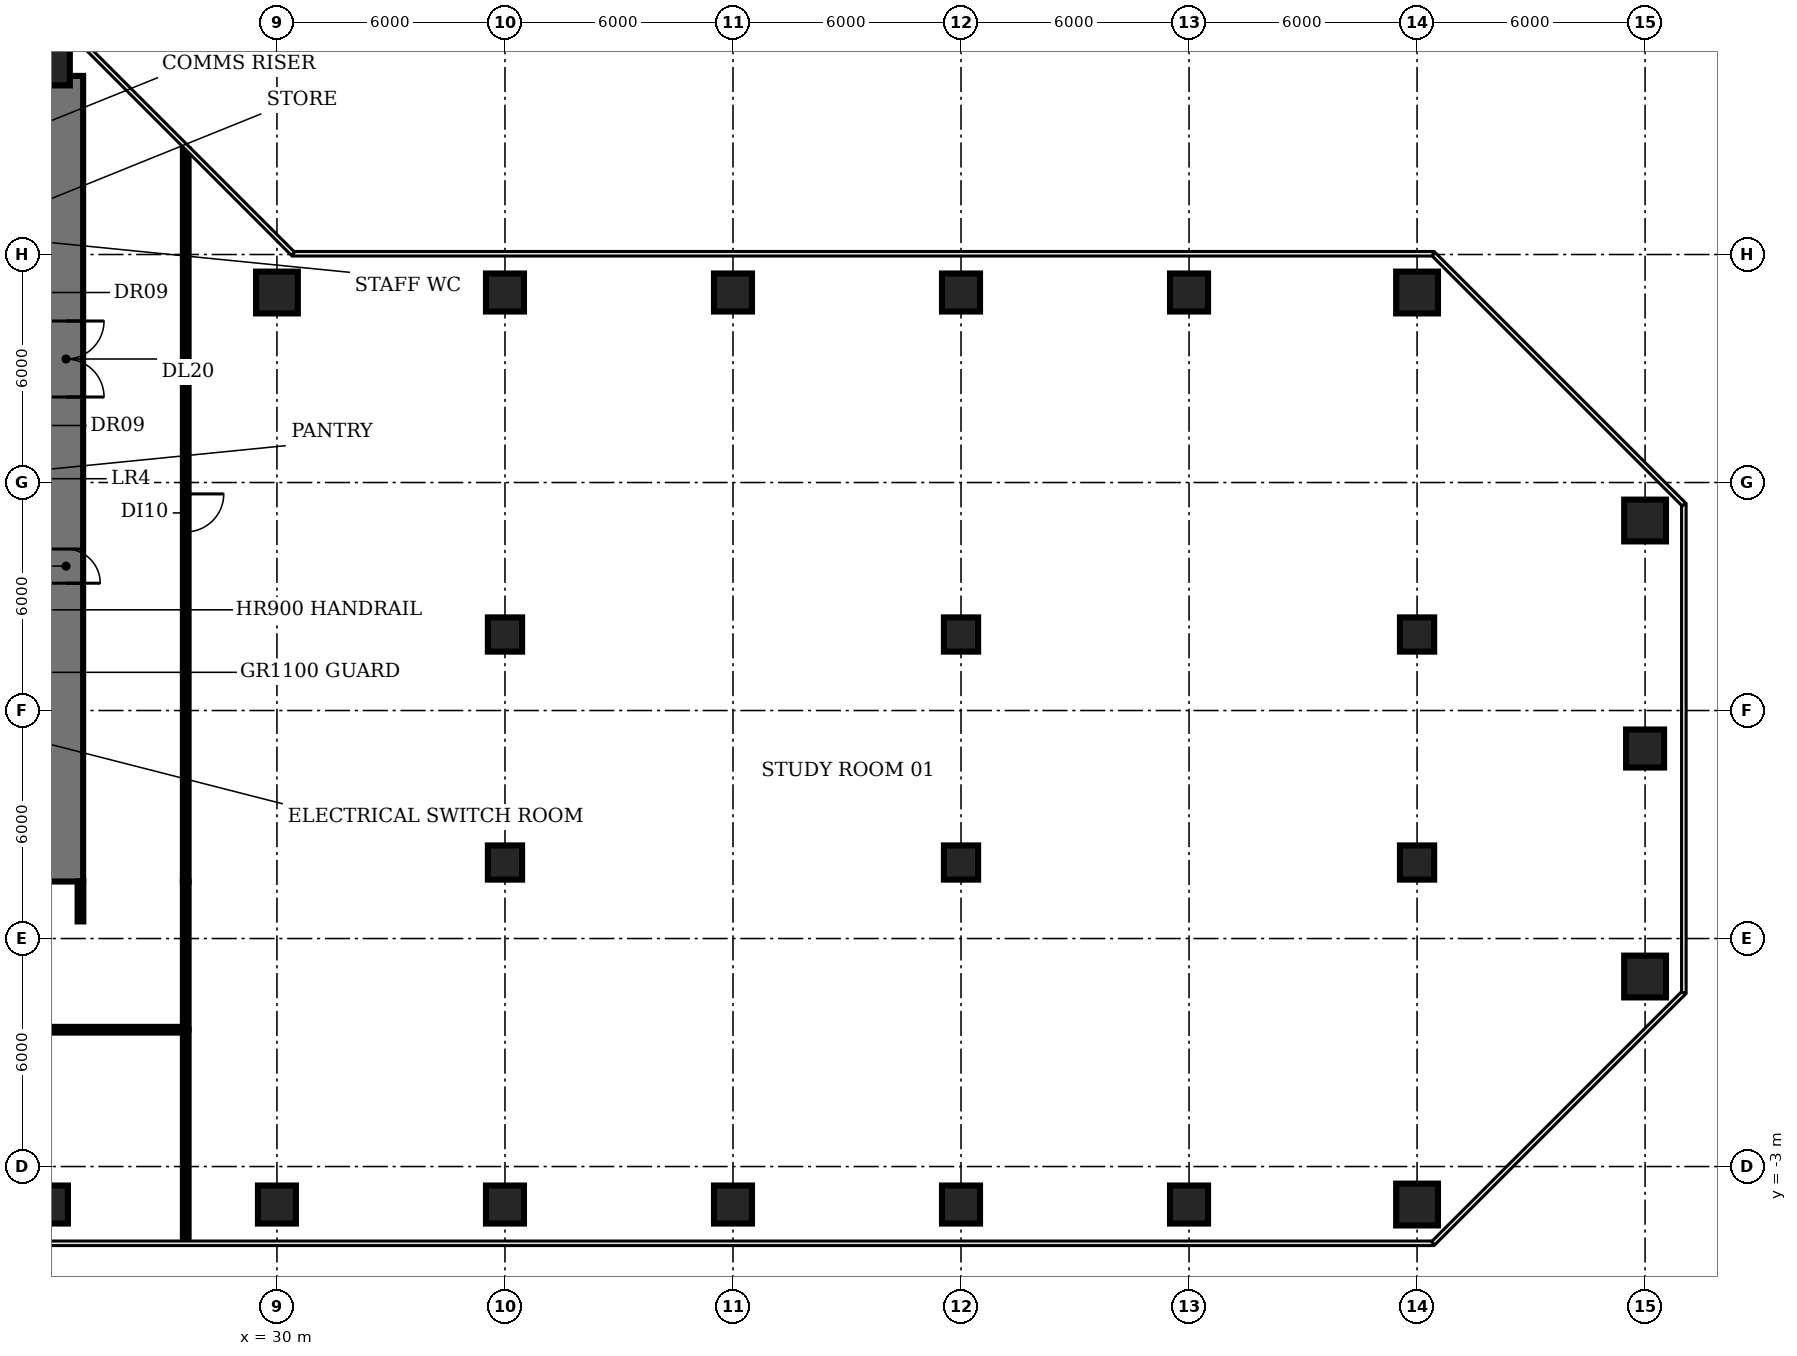
"""IFC4 building model, lengths in metres.
Left out: names, types, materials, properties, quantities, classifications, styles, units other than length and angle.
Written with IfcOpenShell. Run it as: python <this file> out.ifc"""

import sys

from ifc_helpers import new_model, si_unit, direction, frame, frame_2d, origin, origin_2d, place, context, subcontext, project, spatial, rectangle, circle, extrude, element, fill, save


model = new_model("IFC4")
c1 = context("Model", 3, precision=1e-05, world=origin(), true_north=direction((0.0, 1.0)))
c2 = subcontext(c1, "Body", "Model", "MODEL_VIEW")
j1 = project(units=[si_unit("LENGTHUNIT", "METRE"), si_unit("PLANEANGLEUNIT", "RADIAN")], contexts=[c1])
p1 = place(None, origin())
s1 = spatial("IfcSite", under=j1, at=p1, CompositionType="ELEMENT")
p2 = place(p1, origin())
s2 = spatial("IfcBuilding", under=s1, at=p2, CompositionType="ELEMENT")
p3 = place(p2, frame((0.0, 0.0, 15.5)))
s3 = spatial("IfcBuildingStorey", under=s2, at=p3, CompositionType="ELEMENT", Elevation=15.5)
p4 = place(p3, frame((24.0, -4.0, 0.0), z_axis=(0.0, 0.0, 1.0), x_axis=(1.0, 0.0, 0.0)))
e1 = element("IfcColumn", 1, at=p4, inside=s3, PredefinedType="COLUMN", context=c2, shape_type="SweptSolid", body=[
    extrude(rectangle(XDim=1.0, YDim=1.0, at=origin_2d()), origin(), (0.0, 0.0, 1.0), 4.15),
])
p5 = place(p3, frame((24.0, 26.0, 0.0), z_axis=(0.0, 0.0, 1.0), x_axis=(1.0, 0.0, 0.0)))
e2 = element("IfcColumn", 2, at=p5, inside=s3, PredefinedType="COLUMN", context=c2, shape_type="SweptSolid", body=[
    extrude(circle(Radius=0.55, at=origin_2d()), origin(), (0.0, 0.0, 1.0), 4.15),
])
p6 = place(p3, frame((30.0, -4.0, 0.0), z_axis=(0.0, 0.0, 1.0), x_axis=(1.0, 0.0, 0.0)))
e3 = element("IfcColumn", 3, at=p6, inside=s3, PredefinedType="COLUMN", context=c2, shape_type="SweptSolid", body=[
    extrude(rectangle(XDim=1.0, YDim=1.0, at=origin_2d()), origin(), (0.0, 0.0, 1.0), 4.15),
])
p7 = place(p3, frame((30.0, 20.0, 0.0), z_axis=(0.0, 0.0, 1.0), x_axis=(1.0, 0.0, 0.0)))
e4 = element("IfcColumn", 4, at=p7, inside=s3, PredefinedType="COLUMN", context=c2, shape_type="SweptSolid", body=[
    extrude(circle(Radius=0.55, at=origin_2d()), origin(), (0.0, 0.0, 1.0), 4.15),
])
p8 = place(p3, frame((36.0, -4.0, 0.0), z_axis=(0.0, 0.0, 1.0), x_axis=(1.0, 0.0, 0.0)))
e5 = element("IfcColumn", 5, at=p8, inside=s3, PredefinedType="COLUMN", context=c2, shape_type="SweptSolid", body=[
    extrude(rectangle(XDim=1.0, YDim=1.0, at=origin_2d()), origin(), (0.0, 0.0, 1.0), 4.15),
])
for number, where, z_axis, x_axis in (
    (6, (36.0, 5.0, 0.0), (0.0, 0.0, 1.0), (1.0, 0.0, 0.0)),
    (7, (36.0, 11.0, 0.0), (0.0, 0.0, 1.0), (1.0, 0.0, 0.0)),
):
    element("IfcColumn", number, at=place(p3, frame(where, z_axis=z_axis, x_axis=x_axis)), inside=s3, PredefinedType="COLUMN", context=c2, shape_type="SweptSolid", body=[
        extrude(rectangle(XDim=0.9, YDim=0.9, at=origin_2d()), origin(), (0.0, 0.0, 1.0), 4.15),
    ])
for number, where, z_axis, x_axis in (
    (8, (36.0, 20.0, 0.0), (0.0, 0.0, 1.0), (1.0, 0.0, 0.0)),
    (9, (42.0, -4.0, 0.0), (0.0, 0.0, 1.0), (1.0, 0.0, 0.0)),
    (10, (42.0, 20.0, 0.0), (0.0, 0.0, 1.0), (1.0, 0.0, 0.0)),
    (11, (48.0, -4.0, 0.0), (0.0, 0.0, 1.0), (1.0, 0.0, 0.0)),
):
    element("IfcColumn", number, at=place(p3, frame(where, z_axis=z_axis, x_axis=x_axis)), inside=s3, PredefinedType="COLUMN", context=c2, shape_type="SweptSolid", body=[
        extrude(rectangle(XDim=1.0, YDim=1.0, at=origin_2d()), origin(), (0.0, 0.0, 1.0), 4.15),
    ])
for number, where, z_axis, x_axis in (
    (12, (48.0, 5.0, 0.0), (0.0, 0.0, 1.0), (1.0, 0.0, 0.0)),
    (13, (48.0, 11.0, 0.0), (0.0, 0.0, 1.0), (1.0, 0.0, 0.0)),
):
    element("IfcColumn", number, at=place(p3, frame(where, z_axis=z_axis, x_axis=x_axis)), inside=s3, PredefinedType="COLUMN", context=c2, shape_type="SweptSolid", body=[
        extrude(rectangle(XDim=0.9, YDim=0.9, at=origin_2d()), origin(), (0.0, 0.0, 1.0), 4.15),
    ])
for number, where, z_axis, x_axis in (
    (14, (48.0, 20.0, 0.0), (0.0, 0.0, 1.0), (1.0, 0.0, 0.0)),
    (15, (54.0, -4.0, 0.0), (0.0, 0.0, 1.0), (1.0, 0.0, 0.0)),
    (16, (54.0, 20.0, 0.0), (0.0, 0.0, 1.0), (1.0, 0.0, 0.0)),
):
    element("IfcColumn", number, at=place(p3, frame(where, z_axis=z_axis, x_axis=x_axis)), inside=s3, PredefinedType="COLUMN", context=c2, shape_type="SweptSolid", body=[
        extrude(rectangle(XDim=1.0, YDim=1.0, at=origin_2d()), origin(), (0.0, 0.0, 1.0), 4.15),
    ])
p9 = place(p3, frame((60.0, -4.0, 0.0), z_axis=(0.0, 0.0, 1.0), x_axis=(1.0, 0.0, 0.0)))
e17 = element("IfcColumn", 17, at=p9, inside=s3, PredefinedType="COLUMN", context=c2, shape_type="SweptSolid", body=[
    extrude(circle(Radius=0.55, at=origin_2d()), origin(), (0.0, 0.0, 1.0), 4.15),
])
for number, where, z_axis, x_axis in (
    (18, (60.0, 5.0, 0.0), (0.0, 0.0, 1.0), (1.0, 0.0, 0.0)),
    (19, (60.0, 11.0, 0.0), (0.0, 0.0, 1.0), (1.0, 0.0, 0.0)),
):
    element("IfcColumn", number, at=place(p3, frame(where, z_axis=z_axis, x_axis=x_axis)), inside=s3, PredefinedType="COLUMN", context=c2, shape_type="SweptSolid", body=[
        extrude(rectangle(XDim=0.9, YDim=0.9, at=origin_2d()), origin(), (0.0, 0.0, 1.0), 4.15),
    ])
for number, where, z_axis, x_axis in (
    (20, (60.0, 20.0, 0.0), (0.0, 0.0, 1.0), (1.0, 0.0, 0.0)),
    (21, (66.0, 2.0, 0.0), (0.0, 0.0, 1.0), (1.0, 0.0, 0.0)),
):
    element("IfcColumn", number, at=place(p3, frame(where, z_axis=z_axis, x_axis=x_axis)), inside=s3, PredefinedType="COLUMN", context=c2, shape_type="SweptSolid", body=[
        extrude(circle(Radius=0.55, at=origin_2d()), origin(), (0.0, 0.0, 1.0), 4.15),
    ])
p10 = place(p3, frame((66.0, 8.0, 0.0), z_axis=(0.0, 0.0, 1.0), x_axis=(1.0, 0.0, 0.0)))
e22 = element("IfcColumn", 22, at=p10, inside=s3, PredefinedType="COLUMN", context=c2, shape_type="SweptSolid", body=[
    extrude(rectangle(XDim=1.0, YDim=1.0, at=origin_2d()), origin(), (0.0, 0.0, 1.0), 4.15),
])
p11 = place(p3, frame((66.0, 14.0, 0.0), z_axis=(0.0, 0.0, 1.0), x_axis=(1.0, 0.0, 0.0)))
e23 = element("IfcColumn", 23, at=p11, inside=s3, PredefinedType="COLUMN", context=c2, shape_type="SweptSolid", body=[
    extrude(circle(Radius=0.55, at=origin_2d()), origin(), (0.0, 0.0, 1.0), 4.15),
])
p12 = place(p3, frame((24.45, 25.7, 0.0), z_axis=(0.0, 0.0, 1.0), x_axis=(0.0, -1.0, 0.0)))
e24 = element("IfcWall", 24, at=p12, inside=s3, PredefinedType="SHEAR", context=c2, shape_type="SweptSolid", body=[
    extrude(rectangle(XDim=21.2, YDim=0.9, at=frame_2d((10.6, 0.0))), origin(), (0.0, 0.0, 1.0), 4.15),
])
p13 = place(p12, frame((12.45, 0.0, 0.0)))
e25 = element("IfcOpeningElement", 25, at=p13, cuts=e24, PredefinedType="OPENING", context=c2, shape_type="SweptSolid", body=[
    extrude(rectangle(XDim=0.9, YDim=2.1, at=frame_2d((0.45, 1.05))), frame((0.0, 0.46, 0.0), z_axis=(0.0, -1.0, 0.0), x_axis=(1.0, 0.0, 0.0)), (0.0, 0.0, 1.0), 0.92),
])
p14 = place(p12, frame((6.45, 0.0, 0.0)))
e26 = element("IfcOpeningElement", 26, at=p14, cuts=e24, PredefinedType="OPENING", context=c2, shape_type="SweptSolid", body=[
    extrude(rectangle(XDim=2.0, YDim=2.1, at=frame_2d((1.0, 1.05))), frame((0.0, 0.46, 0.0), z_axis=(0.0, -1.0, 0.0), x_axis=(1.0, 0.0, 0.0)), (0.0, 0.0, 1.0), 0.92),
])
p15 = place(p3, frame((24.83, 3.45, 0.0), z_axis=(0.0, 0.0, 1.0), x_axis=(0.0, 1.0, 0.0)))
e27 = element("IfcWall", 27, at=p15, inside=s3, PredefinedType="PARTITIONING", context=c2, shape_type="SweptSolid", body=[
    extrude(rectangle(XDim=1.05, YDim=0.15, at=frame_2d((0.525, 0.0))), origin(), (0.0, 0.0, 1.0), 3.08),
])
p16 = place(p3, frame((27.6, -4.97, 0.0), z_axis=(0.0, 0.0, 1.0), x_axis=(0.0, 1.0, 0.0)))
e28 = element("IfcWall", 28, at=p16, inside=s3, PredefinedType="PARTITIONING", context=c2, shape_type="SweptSolid", body=[
    extrude(rectangle(XDim=5.57, YDim=0.15, at=frame_2d((2.785, 0.0))), origin(), (0.0, 0.0, 1.0), 3.08),
])
p17 = place(p3, frame((27.6, 0.6, 0.0), z_axis=(0.0, 0.0, 1.0), x_axis=(-1.0, 0.0, 0.0)))
e29 = element("IfcWall", 29, at=p17, inside=s3, PredefinedType="PARTITIONING", context=c2, shape_type="SweptSolid", body=[
    extrude(rectangle(XDim=25.2, YDim=0.15, at=frame_2d((12.6, 0.0))), origin(), (0.0, 0.0, 1.0), 3.08),
])
p18 = place(p17, frame((12.1, 0.0, 0.0)))
e30 = element("IfcOpeningElement", 30, at=p18, cuts=e29, PredefinedType="OPENING", context=c2, shape_type="SweptSolid", body=[
    extrude(rectangle(XDim=1.2, YDim=2.1, at=frame_2d((0.6, 1.05))), frame((0.0, 0.085, 0.0), z_axis=(0.0, -1.0, 0.0), x_axis=(1.0, 0.0, 0.0)), (0.0, 0.0, 1.0), 0.17),
])
p19 = place(p3, frame((27.6, 0.6, 0.0), z_axis=(0.0, 0.0, 1.0), x_axis=(0.0, 1.0, 0.0)))
e31 = element("IfcWall", 31, at=p19, inside=s3, PredefinedType="PARTITIONING", context=c2, shape_type="SweptSolid", body=[
    extrude(rectangle(XDim=3.9, YDim=0.15, at=frame_2d((1.95, 0.0))), origin(), (0.0, 0.0, 1.0), 3.08),
])
p20 = place(p3, frame((27.6, 23.77, 0.0), z_axis=(0.0, 0.0, 1.0), x_axis=(0.0, -1.0, 0.0)))
e32 = element("IfcWall", 32, at=p20, inside=s3, PredefinedType="PARTITIONING", context=c2, shape_type="SweptSolid", body=[
    extrude(rectangle(XDim=19.27, YDim=0.15, at=frame_2d((9.635, 0.0))), origin(), (0.0, 0.0, 1.0), 3.08),
])
p21 = place(p20, frame((9.07, 0.0, 0.0)))
e33 = element("IfcOpeningElement", 33, at=p21, cuts=e32, PredefinedType="OPENING", context=c2, shape_type="SweptSolid", body=[
    extrude(rectangle(XDim=1.0, YDim=2.1, at=frame_2d((0.5, 1.05))), frame((0.0, 0.085, 0.0), z_axis=(0.0, -1.0, 0.0), x_axis=(1.0, 0.0, 0.0)), (0.0, 0.0, 1.0), 0.17),
])
p22 = place(p14, origin())
e34 = element("IfcDoor", 34, at=p22, inside=s3, OperationType="DOUBLE_DOOR_SINGLE_SWING", PredefinedType="DOOR", context=c2, shape_type="SweptSolid", body=[
    extrude(rectangle(XDim=2.0, YDim=2.1, at=frame_2d((1.0, 1.05))), frame((0.0, 0.025, 0.0), z_axis=(0.0, -1.0, 0.0), x_axis=(1.0, 0.0, 0.0)), (0.0, 0.0, 1.0), 0.05),
])
fill(e26, e34)
p23 = place(p21, origin())
e35 = element("IfcDoor", 35, at=p23, inside=s3, OperationType="SINGLE_SWING_LEFT", PredefinedType="DOOR", context=c2, shape_type="SweptSolid", body=[
    extrude(rectangle(XDim=1.0, YDim=2.1, at=frame_2d((0.5, 1.05))), frame((0.0, 0.025, 0.0), z_axis=(0.0, -1.0, 0.0), x_axis=(1.0, 0.0, 0.0)), (0.0, 0.0, 1.0), 0.05),
])
fill(e33, e35)
save(model, sys.argv[1])
